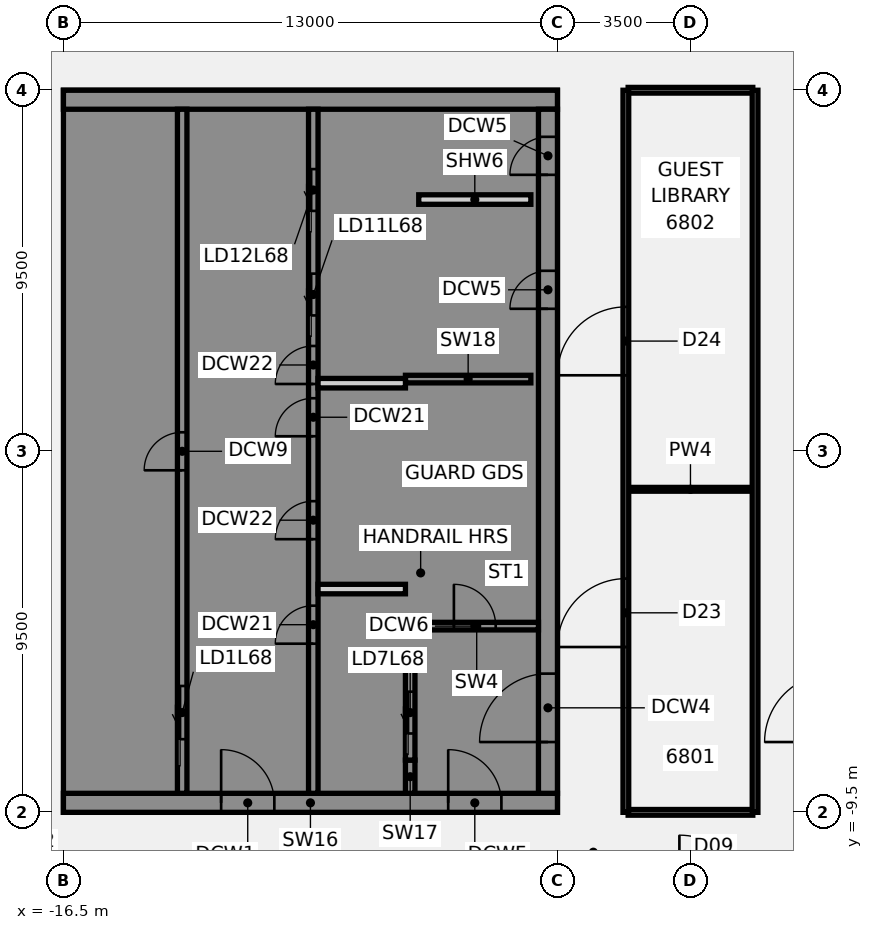
"""IFC4 building model, lengths in metres.
Left out: names, types, materials, properties, quantities, classifications, styles, units other than length and angle.
Written with IfcOpenShell. Run it as: python <this file> out.ifc"""

import sys

from ifc_helpers import new_model, si_unit, direction, frame, frame_2d, origin, place, context, subcontext, project, spatial, polyline, rectangle, outline, extrude, element, fill, save


model = new_model("IFC4")
c1 = context("Model", 3, precision=1e-05, world=origin(), true_north=direction((0.0, 1.0)))
c2 = subcontext(c1, "Body", "Model", "MODEL_VIEW")
j1 = project(units=[si_unit("LENGTHUNIT", "METRE"), si_unit("PLANEANGLEUNIT", "RADIAN")], contexts=[c1])
p1 = place(None, origin())
s1 = spatial("IfcSite", under=j1, at=p1, CompositionType="ELEMENT")
p2 = place(p1, origin())
s2 = spatial("IfcBuilding", under=s1, at=p2, CompositionType="ELEMENT")
p3 = place(p2, frame((0.0, 0.0, 267.6)))
s3 = spatial("IfcBuildingStorey", under=s2, at=p3, CompositionType="ELEMENT", Elevation=267.6)
p4 = place(p3, frame((-1.64, -9.5, 0.0), z_axis=(0.0, 0.0, 1.0), x_axis=(1.0, 0.0, 0.0)))
e1 = element("IfcWall", 1, at=p4, inside=s3, PredefinedType="PARTITIONING", context=c2, shape_type="SweptSolid", body=[
    extrude(rectangle(XDim=3.28, YDim=0.15, at=frame_2d((1.64, 0.0))), origin(), (0.0, 0.0, 1.0), 2.864),
])
p5 = place(p3, frame((-1.64, -1.0, 0.0), z_axis=(0.0, 0.0, 1.0), x_axis=(1.0, 0.0, 0.0)))
e2 = element("IfcWall", 2, at=p5, inside=s3, PredefinedType="PARTITIONING", context=c2, shape_type="SweptSolid", body=[
    extrude(rectangle(XDim=3.28, YDim=0.1, at=frame_2d((1.64, 0.0))), origin(), (0.0, 0.0, 1.0), 2.864),
])
p6 = place(p3, frame((-1.64, 9.5, 0.0), z_axis=(0.0, 0.0, 1.0), x_axis=(1.0, 0.0, 0.0)))
e3 = element("IfcWall", 3, at=p6, inside=s3, PredefinedType="PARTITIONING", context=c2, shape_type="SweptSolid", body=[
    extrude(rectangle(XDim=3.28, YDim=0.15, at=frame_2d((1.64, 0.0))), origin(), (0.0, 0.0, 1.0), 2.864),
])
p7 = place(p3, frame((-1.7, -9.5, 0.0), z_axis=(0.0, 0.0, 1.0), x_axis=(0.0, 1.0, 0.0)))
e4 = element("IfcWall", 4, at=p7, inside=s3, PredefinedType="PARTITIONING", context=c2, shape_type="SweptSolid", body=[
    extrude(rectangle(XDim=19.0, YDim=0.15, at=frame_2d((9.5, 0.0))), origin(), (0.0, 0.0, 1.0), 2.864),
])
p8 = place(p7, frame((4.35, 0.0, 0.0)))
e5 = element("IfcOpeningElement", 5, at=p8, cuts=e4, PredefinedType="OPENING", context=c2, shape_type="SweptSolid", body=[
    extrude(rectangle(XDim=1.8, YDim=2.1, at=frame_2d((0.9, 1.05))), frame((0.0, 0.085, 0.0), z_axis=(0.0, -1.0, 0.0), x_axis=(1.0, 0.0, 0.0)), (0.0, 0.0, 1.0), 0.17),
])
p9 = place(p7, frame((11.5, 0.0, 0.0)))
e6 = element("IfcOpeningElement", 6, at=p9, cuts=e4, PredefinedType="OPENING", context=c2, shape_type="SweptSolid", body=[
    extrude(rectangle(XDim=1.8, YDim=2.1, at=frame_2d((0.9, 1.05))), frame((0.0, 0.085, 0.0), z_axis=(0.0, -1.0, 0.0), x_axis=(1.0, 0.0, 0.0)), (0.0, 0.0, 1.0), 0.17),
])
p10 = place(p3, frame((1.7, -9.5, 0.0), z_axis=(0.0, 0.0, 1.0), x_axis=(0.0, 1.0, 0.0)))
e7 = element("IfcWall", 7, at=p10, inside=s3, PredefinedType="PARTITIONING", context=c2, shape_type="SweptSolid", body=[
    extrude(rectangle(XDim=19.0, YDim=0.15, at=frame_2d((9.5, 0.0))), origin(), (0.0, 0.0, 1.0), 2.864),
])
p11 = place(p3, frame((-16.5, -9.25, 0.0), z_axis=(0.0, 0.0, 1.0), x_axis=(1.0, 0.0, 0.0)))
e8 = element("IfcWall", 8, at=p11, inside=s3, PredefinedType="SHEAR", context=c2, shape_type="SweptSolid", body=[
    extrude(rectangle(XDim=13.0, YDim=0.5, at=frame_2d((6.5, 0.0))), origin(), (0.0, 0.0, 1.0), 3.46),
])
p12 = place(p11, frame((4.15, 0.0, 0.0)))
e9 = element("IfcOpeningElement", 9, at=p12, cuts=e8, PredefinedType="OPENING", context=c2, shape_type="SweptSolid", body=[
    extrude(rectangle(XDim=1.4, YDim=2.1, at=frame_2d((0.7, 1.05))), frame((0.0, 0.26, 0.0), z_axis=(0.0, -1.0, 0.0), x_axis=(1.0, 0.0, 0.0)), (0.0, 0.0, 1.0), 0.52),
])
p13 = place(p11, frame((10.125, 0.0, 0.0)))
e10 = element("IfcOpeningElement", 10, at=p13, cuts=e8, PredefinedType="OPENING", context=c2, shape_type="SweptSolid", body=[
    extrude(rectangle(XDim=1.4, YDim=2.1, at=frame_2d((0.7, 1.05))), frame((0.0, 0.26, 0.0), z_axis=(0.0, -1.0, 0.0), x_axis=(1.0, 0.0, 0.0)), (0.0, 0.0, 1.0), 0.52),
])
p14 = place(p3, origin())
e11 = element("IfcWall", 11, at=p14, inside=s3, PredefinedType="SHEAR", context=c2, shape_type="SweptSolid", body=[
    extrude(outline(polyline([(-13.5, -8.125), (-16.0, -8.125), (-16.0, -5.625), (-13.5, -5.625), (-13.5, -5.375), (-16.0, -5.375), (-16.0, 5.375), (-13.5, 5.375), (-13.5, 5.625), (-16.0, 5.625), (-16.0, 8.125), (-13.5, 8.125), (-13.5, 9.0), (-16.0, 9.0), (-16.5, 9.0), (-16.5, -9.0), (-16.0, -9.0), (-13.5, -9.0), (-13.5, -8.125)])), origin(), (0.0, 0.0, 1.0), 3.46),
])
p15 = place(p3, frame((-16.5, 9.25, 0.0), z_axis=(0.0, 0.0, 1.0), x_axis=(1.0, 0.0, 0.0)))
e12 = element("IfcWall", 12, at=p15, inside=s3, PredefinedType="SHEAR", context=c2, shape_type="SweptSolid", body=[
    extrude(rectangle(XDim=13.0, YDim=0.5, at=frame_2d((6.5, 0.0))), origin(), (0.0, 0.0, 1.0), 3.46),
])
p16 = place(p3, origin())
e13 = element("IfcWall", 13, at=p16, inside=s3, PredefinedType="SHEAR", context=c2, shape_type="SweptSolid", body=[
    extrude(outline(polyline([(-9.8, -5.375), (-9.8, -5.625), (-7.5, -5.625), (-7.25, -5.625), (-7.25, 9.0), (-7.5, 9.0), (-9.8, 9.0), (-9.8, 8.125), (-7.5, 8.125), (-7.5, 5.625), (-9.8, 5.625), (-9.8, 5.375), (-7.5, 5.375), (-7.5, 2.875), (-9.8, 2.875), (-9.8, 2.625), (-7.5, 2.625), (-7.5, -5.375), (-9.8, -5.375)])), origin(), (0.0, 0.0, 1.0), 3.46),
])
p17 = place(p3, origin())
e14 = element("IfcWall", 14, at=p17, inside=s3, PredefinedType="SHEAR", context=c2, shape_type="SweptSolid", body=[
    extrude(outline(polyline([(-7.5, -8.125), (-9.55, -8.125), (-9.55, -5.625), (-9.8, -5.625), (-9.8, -8.125), (-9.8, -9.0), (-7.5, -9.0), (-7.5, -8.125)])), origin(), (0.0, 0.0, 1.0), 3.46),
])
p18 = place(p3, frame((-7.375, -9.0, 0.0), z_axis=(0.0, 0.0, 1.0), x_axis=(0.0, 1.0, 0.0)))
e15 = element("IfcWall", 15, at=p18, inside=s3, PredefinedType="SHEAR", context=c2, shape_type="SweptSolid", body=[
    extrude(rectangle(XDim=0.875, YDim=0.25, at=frame_2d((0.438, 0.0))), origin(), (0.0, 0.0, 1.0), 3.46),
])
p19 = place(p3, frame((-7.5, 1.9, 0.0), z_axis=(0.0, 0.0, 1.0), x_axis=(1.0, 0.0, 0.0)))
e16 = element("IfcWall", 16, at=p19, inside=s3, PredefinedType="SHEAR", context=c2, shape_type="SweptSolid", body=[
    extrude(rectangle(XDim=3.3, YDim=0.2, at=frame_2d((1.65, 0.0))), origin(), (0.0, 0.0, 1.0), 3.46),
])
p20 = place(p3, frame((-13.375, -9.0, 0.0), z_axis=(0.0, 0.0, 1.0), x_axis=(0.0, 1.0, 0.0)))
e17 = element("IfcWall", 17, at=p20, inside=s3, PredefinedType="SHEAR", context=c2, shape_type="SweptSolid", body=[
    extrude(rectangle(XDim=18.0, YDim=0.25, at=frame_2d((9.0, 0.0))), origin(), (0.0, 0.0, 1.0), 3.46),
])
p21 = place(p20, frame((1.425, 0.0, 0.0)))
e18 = element("IfcOpeningElement", 18, at=p21, cuts=e17, PredefinedType="OPENING", context=c2, shape_type="SweptSolid", body=[
    extrude(rectangle(XDim=1.4, YDim=2.1, at=frame_2d((0.7, 1.05))), frame((0.0, 0.135, 0.0), z_axis=(0.0, -1.0, 0.0), x_axis=(1.0, 0.0, 0.0)), (0.0, 0.0, 1.0), 0.27),
])
p22 = place(p20, frame((8.5, 0.0, 0.0)))
e19 = element("IfcOpeningElement", 19, at=p22, cuts=e17, PredefinedType="OPENING", context=c2, shape_type="SweptSolid", body=[
    extrude(rectangle(XDim=1.0, YDim=2.1, at=frame_2d((0.5, 1.05))), frame((0.0, 0.135, 0.0), z_axis=(0.0, -1.0, 0.0), x_axis=(1.0, 0.0, 0.0)), (0.0, 0.0, 1.0), 0.27),
])
p23 = place(p3, frame((-9.925, -9.0, 0.0), z_axis=(0.0, 0.0, 1.0), x_axis=(0.0, 1.0, 0.0)))
e20 = element("IfcWall", 20, at=p23, inside=s3, PredefinedType="SHEAR", context=c2, shape_type="SweptSolid", body=[
    extrude(rectangle(XDim=18.0, YDim=0.25, at=frame_2d((9.0, 0.0))), origin(), (0.0, 0.0, 1.0), 3.46),
])
p24 = place(p23, frame((12.575, 0.0, 0.0)))
e21 = element("IfcOpeningElement", 21, at=p24, cuts=e20, PredefinedType="OPENING", context=c2, shape_type="SweptSolid", body=[
    extrude(rectangle(XDim=1.1, YDim=2.1, at=frame_2d((0.55, 1.05))), frame((0.0, 0.135, 0.0), z_axis=(0.0, -1.0, 0.0), x_axis=(1.0, 0.0, 0.0)), (0.0, 0.0, 1.0), 0.27),
])
p25 = place(p23, frame((15.325, 0.0, 0.0)))
e22 = element("IfcOpeningElement", 22, at=p25, cuts=e20, PredefinedType="OPENING", context=c2, shape_type="SweptSolid", body=[
    extrude(rectangle(XDim=1.1, YDim=2.1, at=frame_2d((0.55, 1.05))), frame((0.0, 0.135, 0.0), z_axis=(0.0, -1.0, 0.0), x_axis=(1.0, 0.0, 0.0)), (0.0, 0.0, 1.0), 0.27),
])
p26 = place(p23, frame((3.938, 0.0, 0.0)))
e23 = element("IfcOpeningElement", 23, at=p26, cuts=e20, PredefinedType="OPENING", context=c2, shape_type="SweptSolid", body=[
    extrude(rectangle(XDim=1.0, YDim=2.1, at=frame_2d((0.5, 1.05))), frame((0.0, 0.135, 0.0), z_axis=(0.0, -1.0, 0.0), x_axis=(1.0, 0.0, 0.0)), (0.0, 0.0, 1.0), 0.27),
])
p27 = place(p23, frame((6.688, 0.0, 0.0)))
e24 = element("IfcOpeningElement", 24, at=p27, cuts=e20, PredefinedType="OPENING", context=c2, shape_type="SweptSolid", body=[
    extrude(rectangle(XDim=1.0, YDim=2.1, at=frame_2d((0.5, 1.05))), frame((0.0, 0.135, 0.0), z_axis=(0.0, -1.0, 0.0), x_axis=(1.0, 0.0, 0.0)), (0.0, 0.0, 1.0), 0.27),
])
p28 = place(p23, frame((9.396, 0.0, 0.0)))
e25 = element("IfcOpeningElement", 25, at=p28, cuts=e20, PredefinedType="OPENING", context=c2, shape_type="SweptSolid", body=[
    extrude(rectangle(XDim=1.0, YDim=2.1, at=frame_2d((0.5, 1.05))), frame((0.0, 0.135, 0.0), z_axis=(0.0, -1.0, 0.0), x_axis=(1.0, 0.0, 0.0)), (0.0, 0.0, 1.0), 0.27),
])
p29 = place(p23, frame((10.771, 0.0, 0.0)))
e26 = element("IfcOpeningElement", 26, at=p29, cuts=e20, PredefinedType="OPENING", context=c2, shape_type="SweptSolid", body=[
    extrude(rectangle(XDim=1.0, YDim=2.1, at=frame_2d((0.5, 1.05))), frame((0.0, 0.135, 0.0), z_axis=(0.0, -1.0, 0.0), x_axis=(1.0, 0.0, 0.0)), (0.0, 0.0, 1.0), 0.27),
])
p30 = place(p3, frame((-7.375, -8.125, 0.0), z_axis=(0.0, 0.0, 1.0), x_axis=(0.0, 1.0, 0.0)))
e27 = element("IfcWall", 27, at=p30, inside=s3, PredefinedType="SHEAR", context=c2, shape_type="SweptSolid", body=[
    extrude(rectangle(XDim=2.5, YDim=0.25, at=frame_2d((1.25, 0.0))), origin(), (0.0, 0.0, 1.0), 3.46),
])
p31 = place(p30, frame((0.7, 0.0, 0.0)))
e28 = element("IfcOpeningElement", 28, at=p31, cuts=e27, PredefinedType="OPENING", context=c2, shape_type="SweptSolid", body=[
    extrude(rectangle(XDim=1.1, YDim=2.1, at=frame_2d((0.55, 1.05))), frame((0.0, 0.135, 0.0), z_axis=(0.0, -1.0, 0.0), x_axis=(1.0, 0.0, 0.0)), (0.0, 0.0, 1.0), 0.27),
])
p32 = place(p3, frame((-3.75, -9.0, 0.0), z_axis=(0.0, 0.0, 1.0), x_axis=(0.0, 1.0, 0.0)))
e29 = element("IfcWall", 29, at=p32, inside=s3, PredefinedType="SHEAR", context=c2, shape_type="SweptSolid", body=[
    extrude(rectangle(XDim=18.0, YDim=0.5, at=frame_2d((9.0, 0.0))), origin(), (0.0, 0.0, 1.0), 3.46),
])
p33 = place(p32, frame((1.35, 0.0, 0.0)))
e30 = element("IfcOpeningElement", 30, at=p33, cuts=e29, PredefinedType="OPENING", context=c2, shape_type="SweptSolid", body=[
    extrude(rectangle(XDim=1.8, YDim=2.1, at=frame_2d((0.9, 1.05))), frame((0.0, 0.26, 0.0), z_axis=(0.0, -1.0, 0.0), x_axis=(1.0, 0.0, 0.0)), (0.0, 0.0, 1.0), 0.52),
])
p34 = place(p32, frame((12.75, 0.0, 0.0)))
e31 = element("IfcOpeningElement", 31, at=p34, cuts=e29, PredefinedType="OPENING", context=c2, shape_type="SweptSolid", body=[
    extrude(rectangle(XDim=1.0, YDim=2.1, at=frame_2d((0.5, 1.05))), frame((0.0, 0.26, 0.0), z_axis=(0.0, -1.0, 0.0), x_axis=(1.0, 0.0, 0.0)), (0.0, 0.0, 1.0), 0.52),
])
p35 = place(p32, frame((16.274, 0.0, 0.0)))
e32 = element("IfcOpeningElement", 32, at=p35, cuts=e29, PredefinedType="OPENING", context=c2, shape_type="SweptSolid", body=[
    extrude(rectangle(XDim=1.0, YDim=2.1, at=frame_2d((0.5, 1.05))), frame((0.0, 0.26, 0.0), z_axis=(0.0, -1.0, 0.0), x_axis=(1.0, 0.0, 0.0)), (0.0, 0.0, 1.0), 0.52),
])
p36 = place(p3, frame((-7.15, 6.624, 0.0), z_axis=(0.0, 0.0, 1.0), x_axis=(1.0, 0.0, 0.0)))
e33 = element("IfcWall", 33, at=p36, inside=s3, PredefinedType="PARTITIONING", context=c2, shape_type="SweptSolid", body=[
    extrude(rectangle(XDim=2.95, YDim=0.25, at=frame_2d((1.475, 0.0))), origin(), (0.0, 0.0, 1.0), 3.46),
])
p37 = place(p3, frame((-7.25, -4.6, 0.0), z_axis=(0.0, 0.0, 1.0), x_axis=(1.0, 0.0, 0.0)))
e34 = element("IfcWall", 34, at=p37, inside=s3, PredefinedType="SHEAR", context=c2, shape_type="SweptSolid", body=[
    extrude(rectangle(XDim=3.25, YDim=0.2, at=frame_2d((1.625, 0.0))), origin(), (0.0, 0.0, 1.0), 3.46),
])
p38 = place(p37, frame((1.025, 0.0, 0.0)))
e35 = element("IfcOpeningElement", 35, at=p38, cuts=e34, PredefinedType="OPENING", context=c2, shape_type="SweptSolid", body=[
    extrude(rectangle(XDim=1.1, YDim=2.1, at=frame_2d((0.55, 1.05))), frame((0.0, 0.11, 0.0), z_axis=(0.0, -1.0, 0.0), x_axis=(1.0, 0.0, 0.0)), (0.0, 0.0, 1.0), 0.22),
])
for number, where, z_axis, x_axis in (
    (36, (-9.8, -3.625, 0.0), (0.0, 0.0, 1.0), (1.0, 0.0, 0.0)),
    (37, (-9.8, 1.792, 0.0), (0.0, 0.0, 1.0), (1.0, 0.0, 0.0)),
):
    element("IfcWall", number, at=place(p3, frame(where, z_axis=z_axis, x_axis=x_axis)), inside=s3, PredefinedType="PARTITIONING", context=c2, shape_type="SweptSolid", body=[
        extrude(rectangle(XDim=2.3, YDim=0.25, at=frame_2d((1.15, 0.0))), origin(), (0.0, 0.0, 1.0), 3.46),
    ])
p39 = place(p8, frame((1.8, 0.0, 0.0), z_axis=(0.0, 0.0, 1.0), x_axis=(-1.0, 0.0, 0.0)))
e38 = element("IfcDoor", 38, at=p39, inside=s3, OperationType="DOUBLE_DOOR_SINGLE_SWING", PredefinedType="DOOR", context=c2, shape_type="SweptSolid", body=[
    extrude(rectangle(XDim=1.8, YDim=2.1, at=frame_2d((0.9, 1.05))), frame((0.0, 0.025, 0.0), z_axis=(0.0, -1.0, 0.0), x_axis=(1.0, 0.0, 0.0)), (0.0, 0.0, 1.0), 0.05),
])
fill(e5, e38)
p40 = place(p9, frame((1.8, 0.0, 0.0), z_axis=(0.0, 0.0, 1.0), x_axis=(-1.0, 0.0, 0.0)))
e39 = element("IfcDoor", 39, at=p40, inside=s3, OperationType="DOUBLE_DOOR_SINGLE_SWING", PredefinedType="DOOR", context=c2, shape_type="SweptSolid", body=[
    extrude(rectangle(XDim=1.8, YDim=2.1, at=frame_2d((0.9, 1.05))), frame((0.0, 0.025, 0.0), z_axis=(0.0, -1.0, 0.0), x_axis=(1.0, 0.0, 0.0)), (0.0, 0.0, 1.0), 0.05),
])
fill(e6, e39)
p41 = place(p12, origin())
e40 = element("IfcDoor", 40, at=p41, inside=s3, OperationType="SINGLE_SWING_LEFT", PredefinedType="DOOR", context=c2, shape_type="SweptSolid", body=[
    extrude(rectangle(XDim=1.4, YDim=2.1, at=frame_2d((0.7, 1.05))), frame((0.0, 0.025, 0.0), z_axis=(0.0, -1.0, 0.0), x_axis=(1.0, 0.0, 0.0)), (0.0, 0.0, 1.0), 0.05),
])
fill(e9, e40)
p42 = place(p13, origin())
e41 = element("IfcDoor", 41, at=p42, inside=s3, OperationType="SINGLE_SWING_LEFT", PredefinedType="DOOR", context=c2, shape_type="SweptSolid", body=[
    extrude(rectangle(XDim=1.4, YDim=2.1, at=frame_2d((0.7, 1.05))), frame((0.0, 0.025, 0.0), z_axis=(0.0, -1.0, 0.0), x_axis=(1.0, 0.0, 0.0)), (0.0, 0.0, 1.0), 0.05),
])
fill(e10, e41)
p43 = place(p33, origin())
e42 = element("IfcDoor", 42, at=p43, inside=s3, OperationType="SINGLE_SWING_LEFT", PredefinedType="DOOR", context=c2, shape_type="SweptSolid", body=[
    extrude(rectangle(XDim=1.8, YDim=2.1, at=frame_2d((0.9, 1.05))), frame((0.0, 0.025, 0.0), z_axis=(0.0, -1.0, 0.0), x_axis=(1.0, 0.0, 0.0)), (0.0, 0.0, 1.0), 0.05),
])
fill(e30, e42)
p44 = place(p34, origin())
e43 = element("IfcDoor", 43, at=p44, inside=s3, OperationType="SINGLE_SWING_LEFT", PredefinedType="DOOR", context=c2, shape_type="SweptSolid", body=[
    extrude(rectangle(XDim=1.0, YDim=2.1, at=frame_2d((0.5, 1.05))), frame((0.0, 0.225, 0.0), z_axis=(0.0, -1.0, 0.0), x_axis=(1.0, 0.0, 0.0)), (0.0, 0.0, 1.0), 0.05),
])
fill(e31, e43)
p45 = place(p35, origin())
e44 = element("IfcDoor", 44, at=p45, inside=s3, OperationType="SINGLE_SWING_LEFT", PredefinedType="DOOR", context=c2, shape_type="SweptSolid", body=[
    extrude(rectangle(XDim=1.0, YDim=2.1, at=frame_2d((0.5, 1.05))), frame((0.0, 0.225, 0.0), z_axis=(0.0, -1.0, 0.0), x_axis=(1.0, 0.0, 0.0)), (0.0, 0.0, 1.0), 0.05),
])
fill(e32, e44)
p46 = place(p38, origin())
e45 = element("IfcDoor", 45, at=p46, inside=s3, OperationType="SINGLE_SWING_LEFT", PredefinedType="DOOR", context=c2, shape_type="SweptSolid", body=[
    extrude(rectangle(XDim=1.1, YDim=2.1, at=frame_2d((0.55, 1.05))), frame((0.0, 0.025, 0.0), z_axis=(0.0, -1.0, 0.0), x_axis=(1.0, 0.0, 0.0)), (0.0, 0.0, 1.0), 0.05),
])
fill(e35, e45)
p47 = place(p21, origin())
e46 = element("IfcDoor", 46, at=p47, inside=s3, OperationType="SLIDING_TO_LEFT", PredefinedType="DOOR", context=c2, shape_type="SweptSolid", body=[
    extrude(rectangle(XDim=1.4, YDim=2.1, at=frame_2d((0.7, 1.05))), frame((0.0, 0.025, 0.0), z_axis=(0.0, -1.0, 0.0), x_axis=(1.0, 0.0, 0.0)), (0.0, 0.0, 1.0), 0.05),
])
fill(e18, e46)
p48 = place(p31, origin())
e47 = element("IfcDoor", 47, at=p48, inside=s3, OperationType="SLIDING_TO_LEFT", PredefinedType="DOOR", context=c2, shape_type="SweptSolid", body=[
    extrude(rectangle(XDim=1.1, YDim=2.1, at=frame_2d((0.55, 1.05))), frame((0.0, 0.025, 0.0), z_axis=(0.0, -1.0, 0.0), x_axis=(1.0, 0.0, 0.0)), (0.0, 0.0, 1.0), 0.05),
])
fill(e28, e47)
p49 = place(p24, origin())
e48 = element("IfcDoor", 48, at=p49, inside=s3, OperationType="SLIDING_TO_LEFT", PredefinedType="DOOR", context=c2, shape_type="SweptSolid", body=[
    extrude(rectangle(XDim=1.1, YDim=2.1, at=frame_2d((0.55, 1.05))), frame((0.0, 0.025, 0.0), z_axis=(0.0, -1.0, 0.0), x_axis=(1.0, 0.0, 0.0)), (0.0, 0.0, 1.0), 0.05),
])
fill(e21, e48)
p50 = place(p25, origin())
e49 = element("IfcDoor", 49, at=p50, inside=s3, OperationType="SLIDING_TO_LEFT", PredefinedType="DOOR", context=c2, shape_type="SweptSolid", body=[
    extrude(rectangle(XDim=1.1, YDim=2.1, at=frame_2d((0.55, 1.05))), frame((0.0, 0.025, 0.0), z_axis=(0.0, -1.0, 0.0), x_axis=(1.0, 0.0, 0.0)), (0.0, 0.0, 1.0), 0.05),
])
fill(e22, e49)
p51 = place(p22, origin())
e50 = element("IfcDoor", 50, at=p51, inside=s3, OperationType="SINGLE_SWING_LEFT", PredefinedType="DOOR", context=c2, shape_type="SweptSolid", body=[
    extrude(rectangle(XDim=1.0, YDim=2.1, at=frame_2d((0.5, 1.05))), frame((0.0, 0.025, 0.0), z_axis=(0.0, -1.0, 0.0), x_axis=(1.0, 0.0, 0.0)), (0.0, 0.0, 1.0), 0.05),
])
fill(e19, e50)
p52 = place(p26, origin())
e51 = element("IfcDoor", 51, at=p52, inside=s3, OperationType="SINGLE_SWING_LEFT", PredefinedType="DOOR", context=c2, shape_type="SweptSolid", body=[
    extrude(rectangle(XDim=1.0, YDim=2.1, at=frame_2d((0.5, 1.05))), frame((0.0, 0.025, 0.0), z_axis=(0.0, -1.0, 0.0), x_axis=(1.0, 0.0, 0.0)), (0.0, 0.0, 1.0), 0.05),
])
fill(e23, e51)
p53 = place(p27, origin())
e52 = element("IfcDoor", 52, at=p53, inside=s3, OperationType="SINGLE_SWING_LEFT", PredefinedType="DOOR", context=c2, shape_type="SweptSolid", body=[
    extrude(rectangle(XDim=1.0, YDim=2.1, at=frame_2d((0.5, 1.05))), frame((0.0, 0.025, 0.0), z_axis=(0.0, -1.0, 0.0), x_axis=(1.0, 0.0, 0.0)), (0.0, 0.0, 1.0), 0.05),
])
fill(e24, e52)
p54 = place(p28, origin())
e53 = element("IfcDoor", 53, at=p54, inside=s3, OperationType="SINGLE_SWING_LEFT", PredefinedType="DOOR", context=c2, shape_type="SweptSolid", body=[
    extrude(rectangle(XDim=1.0, YDim=2.1, at=frame_2d((0.5, 1.05))), frame((0.0, 0.025, 0.0), z_axis=(0.0, -1.0, 0.0), x_axis=(1.0, 0.0, 0.0)), (0.0, 0.0, 1.0), 0.05),
])
fill(e25, e53)
p55 = place(p29, origin())
e54 = element("IfcDoor", 54, at=p55, inside=s3, OperationType="SINGLE_SWING_LEFT", PredefinedType="DOOR", context=c2, shape_type="SweptSolid", body=[
    extrude(rectangle(XDim=1.0, YDim=2.1, at=frame_2d((0.5, 1.05))), frame((0.0, 0.025, 0.0), z_axis=(0.0, -1.0, 0.0), x_axis=(1.0, 0.0, 0.0)), (0.0, 0.0, 1.0), 0.05),
])
fill(e26, e54)
save(model, sys.argv[1])
